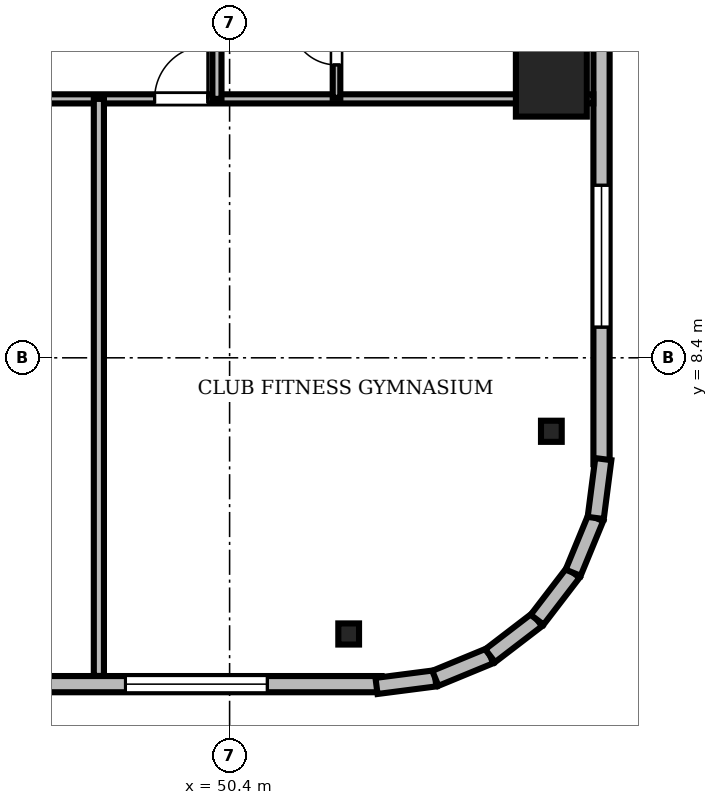
"""IFC4 building model, lengths in metres.
Left out: names, types, materials, properties, quantities, classifications, styles, units other than length and angle.
Written with IfcOpenShell. Run it as: python <this file> out.ifc"""

import sys

from ifc_helpers import new_model, si_unit, direction, frame, frame_2d, origin, origin_2d, place, context, subcontext, project, spatial, rectangle, i_section, extrude, source, transform, mapped, element, fill, save


model = new_model("IFC4")
c1 = context("Model", 3, precision=1e-05, world=origin(), true_north=direction((0.0, 1.0)))
c2 = subcontext(c1, "Body", "Model", "MODEL_VIEW")
j1 = project(units=[si_unit("LENGTHUNIT", "METRE"), si_unit("PLANEANGLEUNIT", "RADIAN")], contexts=[c1])
p1 = place(None, origin())
s1 = spatial("IfcSite", under=j1, at=p1, CompositionType="ELEMENT")
p2 = place(p1, origin())
s2 = spatial("IfcBuilding", under=s1, at=p2, CompositionType="ELEMENT")
p3 = place(p2, frame((0.0, 0.0, 211.05)))
s3 = spatial("IfcBuildingStorey", under=s2, at=p3, CompositionType="ELEMENT", Elevation=211.05)
m1 = source(origin(), c2, "Body", "SweptSolid", [
    extrude(rectangle(XDim=1.4, YDim=1.4, at=origin_2d()), origin(), (0.0, 0.0, 1.0), 3.53),
])
p4 = place(p3, frame((56.75, 13.86, 0.0), z_axis=(0.0, 0.0, 1.0), x_axis=(1.0, 0.0, 0.0)))
e1 = element("IfcColumn", 1, at=p4, inside=s3, PredefinedType="COLUMN", context=c2, shape_type="MappedRepresentation", body=[
    mapped(m1, transform((0.0, 0.0, 0.0), scale=1.0)),
])
m2 = source(origin(), c2, "Body", "SweptSolid", [
    extrude(i_section(OverallWidth=0.409, OverallDepth=0.417, WebThickness=0.021, FlangeThickness=0.033, FilletRadius=0.015, at=origin_2d()), origin(), (0.0, 0.0, 1.0), 3.53),
])
for number, where, z_axis, x_axis in (
    (2, (52.75, 2.95, 0.0), (0.0, 0.0, 1.0), (1.0, 0.0, 0.0)),
    (3, (56.75, 6.95, 0.0), (0.0, 0.0, 1.0), (1.0, 0.0, 0.0)),
):
    element("IfcColumn", number, at=place(p3, frame(where, z_axis=z_axis, x_axis=x_axis)), inside=s3, PredefinedType="COLUMN", context=c2, shape_type="MappedRepresentation", body=[
        mapped(m2, transform((0.0, 0.0, 0.0), scale=1.0)),
    ])
m3 = source(origin(), c2, "Body", "SweptSolid", [
    extrude(rectangle(XDim=15.6, YDim=0.32, at=frame_2d((7.8, 0.0))), origin(), (0.0, 0.0, 1.0), 3.53),
])
p5 = place(p3, frame((37.8, 1.96, 0.0), z_axis=(0.0, 0.0, 1.0), x_axis=(1.0, 0.0, 0.0)))
e4 = element("IfcWall", 4, at=p5, inside=s3, PredefinedType="SOLIDWALL", context=c2, shape_type="MappedRepresentation", body=[
    mapped(m3, transform((0.0, 0.0, 0.0), scale=1.0)),
])
m4 = source(origin(), c2, "Body", "SweptSolid", [
    extrude(rectangle(XDim=2.8, YDim=2.4, at=frame_2d((1.4, 1.2))), frame((0.0, 0.17, 0.0), z_axis=(0.0, -1.0, 0.0), x_axis=(1.0, 0.0, 0.0)), (0.0, 0.0, 1.0), 0.34),
])
p6 = place(p5, frame((10.545, 0.0, 0.72)))
e5 = element("IfcOpeningElement", 5, at=p6, cuts=e4, PredefinedType="OPENING", context=c2, shape_type="MappedRepresentation", body=[
    mapped(m4, transform((0.0, 0.0, 0.0), scale=1.0)),
])
p7 = place(p3, frame((57.74, 6.3, 0.0), z_axis=(0.0, 0.0, 1.0), x_axis=(0.0, 1.0, 0.0)))
e6 = element("IfcWall", 6, at=p7, inside=s3, PredefinedType="SOLIDWALL", context=c2, shape_type="MappedRepresentation", body=[
    mapped(m3, transform((0.0, 0.0, 0.0), scale=1.0)),
])
m5 = source(origin(), c2, "Body", "SweptSolid", [
    extrude(rectangle(XDim=1.4, YDim=2.3, at=frame_2d((0.7, 1.15))), frame((0.0, 0.17, 0.0), z_axis=(0.0, -1.0, 0.0), x_axis=(1.0, 0.0, 0.0)), (0.0, 0.0, 1.0), 0.34),
])
p8 = place(p7, frame((9.61, 0.0, 0.0)))
e7 = element("IfcOpeningElement", 7, at=p8, cuts=e6, PredefinedType="OPENING", context=c2, shape_type="MappedRepresentation", body=[
    mapped(m5, transform((0.0, 0.0, 0.0), scale=1.0)),
])
p9 = place(p7, frame((2.705, 0.0, 0.72)))
e8 = element("IfcOpeningElement", 8, at=p9, cuts=e6, PredefinedType="OPENING", context=c2, shape_type="MappedRepresentation", body=[
    mapped(m4, transform((0.0, 0.0, 0.0), scale=1.0)),
])
m6 = source(origin(), c2, "Body", "SweptSolid", [
    extrude(rectangle(XDim=1.17, YDim=0.32, at=frame_2d((0.585, 0.0))), origin(), (0.0, 0.0, 1.0), 3.53),
])
p10 = place(p3, frame((53.3, 1.925, 0.0), z_axis=(0.0, 0.0, 1.0), x_axis=(0.991762485493, 0.128090485085, 0.0)))
e9 = element("IfcWall", 9, at=p10, inside=s3, PredefinedType="SOLIDWALL", context=c2, shape_type="MappedRepresentation", body=[
    mapped(m6, transform((0.0, 0.0, 0.0), scale=1.0)),
])
m7 = source(origin(), c2, "Body", "SweptSolid", [
    extrude(rectangle(XDim=1.169, YDim=0.32, at=frame_2d((0.585, 0.0))), origin(), (0.0, 0.0, 1.0), 3.53),
])
p11 = place(p3, frame((54.46, 2.074, 0.0), z_axis=(0.0, 0.0, 1.0), x_axis=(0.924479075121, 0.381232789334, 0.0)))
e10 = element("IfcWall", 10, at=p11, inside=s3, PredefinedType="SOLIDWALL", context=c2, shape_type="MappedRepresentation", body=[
    mapped(m7, transform((0.0, 0.0, 0.0), scale=1.0)),
])
m8 = source(origin(), c2, "Body", "SweptSolid", [
    extrude(rectangle(XDim=1.169, YDim=0.32, at=frame_2d((0.584, 0.0))), origin(), (0.0, 0.0, 1.0), 3.53),
])
p12 = place(p3, frame((55.541, 2.52, 0.0), z_axis=(0.0, 0.0, 1.0), x_axis=(0.793663520347, 0.608356981114, 0.0)))
e11 = element("IfcWall", 11, at=p12, inside=s3, PredefinedType="SOLIDWALL", context=c2, shape_type="MappedRepresentation", body=[
    mapped(m8, transform((0.0, 0.0, 0.0), scale=1.0)),
])
m9 = source(origin(), c2, "Body", "SweptSolid", [
    extrude(rectangle(XDim=1.169, YDim=0.32, at=frame_2d((0.584, 0.0))), origin(), (0.0, 0.0, 1.0), 3.53),
])
for number, where, z_axis, x_axis in (
    (12, (56.469, 3.231, 0.0), (0.0, 0.0, 1.0), (0.608, 0.794, 0.0)),
    (13, (57.18, 4.159, 0.0), (0.0, 0.0, 1.0), (0.381, 0.925, 0.0)),
):
    element("IfcWall", number, at=place(p3, frame(where, z_axis=z_axis, x_axis=x_axis)), inside=s3, PredefinedType="SOLIDWALL", context=c2, shape_type="MappedRepresentation", body=[
        mapped(m9, transform((0.0, 0.0, 0.0), scale=1.0)),
    ])
m10 = source(origin(), c2, "Body", "SweptSolid", [
    extrude(rectangle(XDim=1.171, YDim=0.32, at=frame_2d((0.585, 0.0))), origin(), (0.0, 0.0, 1.0), 3.53),
])
p13 = place(p3, frame((57.625, 5.24, 0.0), z_axis=(0.0, 0.0, 1.0), x_axis=(0.128269133229, 0.991739395941, 0.0)))
e14 = element("IfcWall", 14, at=p13, inside=s3, PredefinedType="SOLIDWALL", context=c2, shape_type="MappedRepresentation", body=[
    mapped(m10, transform((0.0, 0.0, 0.0), scale=1.0)),
])
m11 = source(origin(), c2, "Body", "SweptSolid", [
    extrude(rectangle(XDim=46.156, YDim=0.18, at=frame_2d((23.078, 0.0))), origin(), (0.0, 0.0, 1.0), 2.772),
])
p14 = place(p3, frame((11.422, 13.51, 0.0), z_axis=(0.0, 0.0, 1.0), x_axis=(1.0, 0.0, 0.0)))
e15 = element("IfcWall", 15, at=p14, inside=s3, PredefinedType="PARTITIONING", context=c2, shape_type="MappedRepresentation", body=[
    mapped(m11, transform((0.0, 0.0, 0.0), scale=1.0)),
])
m12 = source(origin(), c2, "Body", "SweptSolid", [
    extrude(rectangle(XDim=1.05, YDim=2.2, at=frame_2d((0.525, 1.1))), frame((0.0, 0.1, 0.0), z_axis=(0.0, -1.0, 0.0), x_axis=(1.0, 0.0, 0.0)), (0.0, 0.0, 1.0), 0.2),
])
p15 = place(p14, frame((8.398, 0.0, 0.0)))
e16 = element("IfcOpeningElement", 16, at=p15, cuts=e15, PredefinedType="OPENING", context=c2, shape_type="MappedRepresentation", body=[
    mapped(m12, transform((0.0, 0.0, 0.0), scale=1.0)),
])
p16 = place(p14, frame((10.953, 0.0, 0.0)))
e17 = element("IfcOpeningElement", 17, at=p16, cuts=e15, PredefinedType="OPENING", context=c2, shape_type="MappedRepresentation", body=[
    mapped(m12, transform((0.0, 0.0, 0.0), scale=1.0)),
])
p17 = place(p14, frame((14.645, 0.0, 0.0)))
e18 = element("IfcOpeningElement", 18, at=p17, cuts=e15, PredefinedType="OPENING", context=c2, shape_type="MappedRepresentation", body=[
    mapped(m12, transform((0.0, 0.0, 0.0), scale=1.0)),
])
m13 = source(origin(), c2, "Body", "SweptSolid", [
    extrude(rectangle(XDim=0.95, YDim=2.15, at=frame_2d((0.475, 1.075))), frame((0.0, 0.1, 0.0), z_axis=(0.0, -1.0, 0.0), x_axis=(1.0, 0.0, 0.0)), (0.0, 0.0, 1.0), 0.2),
])
p18 = place(p14, frame((20.057, 0.0, 0.0)))
e19 = element("IfcOpeningElement", 19, at=p18, cuts=e15, PredefinedType="OPENING", context=c2, shape_type="MappedRepresentation", body=[
    mapped(m13, transform((0.0, 0.0, 0.0), scale=1.0)),
])
p19 = place(p14, frame((23.274, 0.0, 0.0)))
e20 = element("IfcOpeningElement", 20, at=p19, cuts=e15, PredefinedType="OPENING", context=c2, shape_type="MappedRepresentation", body=[
    mapped(m12, transform((0.0, 0.0, 0.0), scale=1.0)),
])
p20 = place(p14, frame((27.716, 0.0, 0.0)))
e21 = element("IfcOpeningElement", 21, at=p20, cuts=e15, PredefinedType="OPENING", context=c2, shape_type="MappedRepresentation", body=[
    mapped(m12, transform((0.0, 0.0, 0.0), scale=1.0)),
])
p21 = place(p14, frame((32.907, 0.0, 0.0)))
e22 = element("IfcOpeningElement", 22, at=p21, cuts=e15, PredefinedType="OPENING", context=c2, shape_type="MappedRepresentation", body=[
    mapped(m12, transform((0.0, 0.0, 0.0), scale=1.0)),
])
p22 = place(p14, frame((37.498, 0.0, 0.0)))
e23 = element("IfcOpeningElement", 23, at=p22, cuts=e15, PredefinedType="OPENING", context=c2, shape_type="MappedRepresentation", body=[
    mapped(m12, transform((0.0, 0.0, 0.0), scale=1.0)),
])
m14 = source(origin(), c2, "Body", "SweptSolid", [
    extrude(rectangle(XDim=27.59, YDim=0.18, at=frame_2d((13.795, 0.0))), origin(), (0.0, 0.0, 1.0), 2.972),
])
p23 = place(p3, frame((50.15, 13.51, 0.0), z_axis=(0.0, 0.0, 1.0), x_axis=(0.0, 1.0, 0.0)))
e24 = element("IfcWall", 24, at=p23, inside=s3, PredefinedType="PARTITIONING", context=c2, shape_type="MappedRepresentation", body=[
    mapped(m14, transform((0.0, 0.0, 0.0), scale=1.0)),
])
p24 = place(p23, frame((4.086, 0.0, 0.0)))
e25 = element("IfcOpeningElement", 25, at=p24, cuts=e24, PredefinedType="OPENING", context=c2, shape_type="MappedRepresentation", body=[
    mapped(m12, transform((0.0, 0.0, 0.0), scale=1.0)),
])
p25 = place(p23, frame((9.744, 0.0, 0.0)))
e26 = element("IfcOpeningElement", 26, at=p25, cuts=e24, PredefinedType="OPENING", context=c2, shape_type="MappedRepresentation", body=[
    mapped(m12, transform((0.0, 0.0, 0.0), scale=1.0)),
])
p26 = place(p23, frame((17.771, 0.0, 0.0)))
e27 = element("IfcOpeningElement", 27, at=p26, cuts=e24, PredefinedType="OPENING", context=c2, shape_type="MappedRepresentation", body=[
    mapped(m12, transform((0.0, 0.0, 0.0), scale=1.0)),
])
p27 = place(p23, frame((24.614, 0.0, 0.0)))
e28 = element("IfcOpeningElement", 28, at=p27, cuts=e24, PredefinedType="OPENING", context=c2, shape_type="MappedRepresentation", body=[
    mapped(m12, transform((0.0, 0.0, 0.0), scale=1.0)),
])
m15 = source(origin(), c2, "Body", "SweptSolid", [
    extrude(rectangle(XDim=2.29, YDim=0.15, at=frame_2d((1.145, 0.0))), origin(), (0.0, 0.0, 1.0), 2.972),
])
p28 = place(p3, frame((52.51, 13.53, 0.0), z_axis=(0.0, 0.0, 1.0), x_axis=(0.0, 1.0, 0.0)))
e29 = element("IfcWall", 29, at=p28, inside=s3, PredefinedType="PARTITIONING", context=c2, shape_type="MappedRepresentation", body=[
    mapped(m15, transform((0.0, 0.0, 0.0), scale=1.0)),
])
m16 = source(origin(), c2, "Body", "SweptSolid", [
    extrude(rectangle(XDim=0.9, YDim=2.1, at=frame_2d((0.45, 1.05))), frame((0.0, 0.085, 0.0), z_axis=(0.0, -1.0, 0.0), x_axis=(1.0, 0.0, 0.0)), (0.0, 0.0, 1.0), 0.17),
])
p29 = place(p28, frame((0.65, 0.0, 0.0)))
e30 = element("IfcOpeningElement", 30, at=p29, cuts=e29, PredefinedType="OPENING", context=c2, shape_type="MappedRepresentation", body=[
    mapped(m16, transform((0.0, 0.0, 0.0), scale=1.0)),
])
m17 = source(origin(), c2, "Body", "SweptSolid", [
    extrude(rectangle(XDim=11.388, YDim=0.2, at=frame_2d((5.694, 0.0))), origin(), (0.0, 0.0, 1.0), 2.772),
])
p30 = place(p3, frame((47.82, 2.122, 0.0), z_axis=(0.0, 0.0, 1.0), x_axis=(0.0, 1.0, 0.0)))
e31 = element("IfcWall", 31, at=p30, inside=s3, PredefinedType="PARTITIONING", context=c2, shape_type="MappedRepresentation", body=[
    mapped(m17, transform((0.0, 0.0, 0.0), scale=1.0)),
])
m18 = source(origin(), c2, "Body", "SweptSolid", [
    extrude(rectangle(XDim=2.8, YDim=2.4, at=frame_2d((1.4, 1.2))), frame((0.0, 0.03, 0.0), z_axis=(0.0, -1.0, 0.0), x_axis=(1.0, 0.0, 0.0)), (0.0, 0.0, 1.0), 0.06),
])
p31 = place(p6, origin())
e32 = element("IfcWindow", 32, at=p31, inside=s3, PartitioningType="SINGLE_PANEL", PredefinedType="WINDOW", context=c2, shape_type="MappedRepresentation", body=[
    mapped(m18, transform((0.0, 0.0, 0.0), scale=1.0)),
])
fill(e5, e32)
p32 = place(p9, origin())
e33 = element("IfcWindow", 33, at=p32, inside=s3, PartitioningType="SINGLE_PANEL", PredefinedType="WINDOW", context=c2, shape_type="MappedRepresentation", body=[
    mapped(m18, transform((0.0, 0.0, 0.0), scale=1.0)),
])
fill(e8, e33)
m19 = source(origin(), c2, "Body", "SweptSolid", [
    extrude(rectangle(XDim=1.05, YDim=2.2, at=frame_2d((0.525, 1.1))), frame((0.0, 0.025, 0.0), z_axis=(0.0, -1.0, 0.0), x_axis=(1.0, 0.0, 0.0)), (0.0, 0.0, 1.0), 0.05),
])
p33 = place(p22, origin())
e34 = element("IfcDoor", 34, at=p33, inside=s3, OperationType="SINGLE_SWING_RIGHT", PredefinedType="DOOR", context=c2, shape_type="MappedRepresentation", body=[
    mapped(m19, transform((0.0, 0.0, 0.0), scale=1.0)),
])
fill(e23, e34)
m20 = source(origin(), c2, "Body", "SweptSolid", [
    extrude(rectangle(XDim=0.9, YDim=2.1, at=frame_2d((0.45, 1.05))), frame((0.0, 0.025, 0.0), z_axis=(0.0, -1.0, 0.0), x_axis=(1.0, 0.0, 0.0)), (0.0, 0.0, 1.0), 0.05),
])
p34 = place(p29, origin())
e35 = element("IfcDoor", 35, at=p34, inside=s3, OperationType="SINGLE_SWING_RIGHT", PredefinedType="DOOR", context=c2, shape_type="MappedRepresentation", body=[
    mapped(m20, transform((0.0, 0.0, 0.0), scale=1.0)),
])
fill(e30, e35)
save(model, sys.argv[1])
